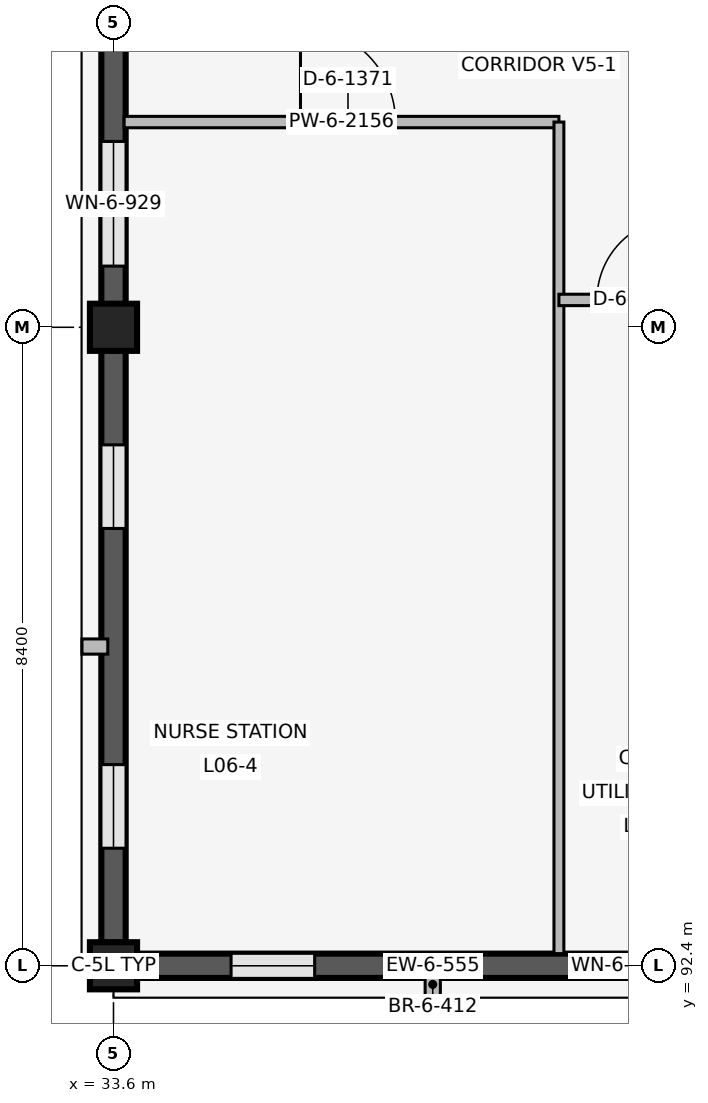
"""IFC4 building model, lengths in metres.
Left out: names, types, materials, properties, quantities, classifications, styles, units other than length and angle.
Written with IfcOpenShell. Run it as: python <this file> out.ifc"""

import sys

from ifc_helpers import new_model, si_unit, direction, frame, frame_2d, origin, origin_2d, place, context, subcontext, project, spatial, rectangle, extrude, element, fill, save


model = new_model("IFC4")
c1 = context("Model", 3, precision=1e-05, world=origin(), true_north=direction((0.0, 1.0)))
c2 = subcontext(c1, "Body", "Model", "MODEL_VIEW")
j1 = project(units=[si_unit("LENGTHUNIT", "METRE"), si_unit("PLANEANGLEUNIT", "RADIAN")], contexts=[c1])
p1 = place(None, origin())
s1 = spatial("IfcSite", under=j1, at=p1, CompositionType="ELEMENT")
p2 = place(p1, origin())
s2 = spatial("IfcBuilding", under=s1, at=p2, CompositionType="ELEMENT")
p3 = place(p2, frame((0.0, 0.0, 24.6)))
s3 = spatial("IfcBuildingStorey", under=s2, at=p3, CompositionType="ELEMENT", Elevation=24.6)
for number, where, z_axis, x_axis in (
    (1, (33.6, 92.4, 0.0), (0.0, 0.0, 1.0), (1.0, 0.0, 0.0)),
    (2, (33.6, 100.8, 0.0), (0.0, 0.0, 1.0), (1.0, 0.0, 0.0)),
):
    element("IfcColumn", number, at=place(p3, frame(where, z_axis=z_axis, x_axis=x_axis)), inside=s3, PredefinedType="COLUMN", context=c2, shape_type="SweptSolid", body=[
        extrude(rectangle(XDim=0.62, YDim=0.62, at=origin_2d()), origin(), (0.0, 0.0, 1.0), 4.2),
    ])
p4 = place(p3, frame((41.695, 92.4, 0.0), z_axis=(0.0, 0.0, 1.0), x_axis=(-1.0, 0.0, 0.0)))
e3 = element("IfcWall", 3, at=p4, inside=s3, PredefinedType="SOLIDWALL", context=c2, shape_type="SweptSolid", body=[
    extrude(rectangle(XDim=7.79, YDim=0.32, at=frame_2d((3.895, 0.0))), origin(), (0.0, 0.0, 1.0), 3.34),
])
p5 = place(p4, frame((0.89, 0.0, 0.85)))
e4 = element("IfcOpeningElement", 4, at=p5, cuts=e3, PredefinedType="OPENING", context=c2, shape_type="SweptSolid", body=[
    extrude(rectangle(XDim=1.1, YDim=1.6, at=frame_2d((0.55, 0.8))), frame((0.0, 0.17, 0.0), z_axis=(0.0, -1.0, 0.0), x_axis=(1.0, 0.0, 0.0)), (0.0, 0.0, 1.0), 0.34),
])
p6 = place(p4, frame((5.448, 0.0, 0.85)))
e5 = element("IfcOpeningElement", 5, at=p6, cuts=e3, PredefinedType="OPENING", context=c2, shape_type="SweptSolid", body=[
    extrude(rectangle(XDim=1.1, YDim=1.6, at=frame_2d((0.55, 0.8))), frame((0.0, 0.17, 0.0), z_axis=(0.0, -1.0, 0.0), x_axis=(1.0, 0.0, 0.0)), (0.0, 0.0, 1.0), 0.34),
])
p7 = place(p3, frame((37.8, 92.325, 0.0), z_axis=(0.0, 0.0, 1.0), x_axis=(0.0, -1.0, 0.0)))
e6 = element("IfcWall", 6, at=p7, inside=s3, PredefinedType="ELEMENTEDWALL", context=c2, shape_type="SweptSolid", body=[
    extrude(rectangle(XDim=0.34, YDim=0.2, at=frame_2d((0.17, 0.0))), origin(), (0.0, 0.0, 1.0), 3.32),
])
p8 = place(p3, frame((33.6, 92.705, 0.0), z_axis=(0.0, 0.0, 1.0), x_axis=(0.0, 1.0, 0.0)))
e7 = element("IfcWall", 7, at=p8, inside=s3, PredefinedType="SOLIDWALL", context=c2, shape_type="SweptSolid", body=[
    extrude(rectangle(XDim=7.79, YDim=0.32, at=frame_2d((3.895, 0.0))), origin(), (0.0, 0.0, 1.0), 3.34),
])
p9 = place(p8, frame((1.242, 0.0, 0.85)))
e8 = element("IfcOpeningElement", 8, at=p9, cuts=e7, PredefinedType="OPENING", context=c2, shape_type="SweptSolid", body=[
    extrude(rectangle(XDim=1.1, YDim=1.6, at=frame_2d((0.55, 0.8))), frame((0.0, 0.17, 0.0), z_axis=(0.0, -1.0, 0.0), x_axis=(1.0, 0.0, 0.0)), (0.0, 0.0, 1.0), 0.34),
])
p10 = place(p8, frame((5.448, 0.0, 0.85)))
e9 = element("IfcOpeningElement", 9, at=p10, cuts=e7, PredefinedType="OPENING", context=c2, shape_type="SweptSolid", body=[
    extrude(rectangle(XDim=1.1, YDim=1.6, at=frame_2d((0.55, 0.8))), frame((0.0, 0.17, 0.0), z_axis=(0.0, -1.0, 0.0), x_axis=(1.0, 0.0, 0.0)), (0.0, 0.0, 1.0), 0.34),
])
p11 = place(p3, frame((33.525, 96.6, 0.0), z_axis=(0.0, 0.0, 1.0), x_axis=(-1.0, 0.0, 0.0)))
e10 = element("IfcWall", 10, at=p11, inside=s3, PredefinedType="ELEMENTEDWALL", context=c2, shape_type="SweptSolid", body=[
    extrude(rectangle(XDim=0.34, YDim=0.2, at=frame_2d((0.17, 0.0))), origin(), (0.0, 0.0, 1.0), 3.32),
])
p12 = place(p3, frame((33.6, 101.105, 0.0), z_axis=(0.0, 0.0, 1.0), x_axis=(0.0, 1.0, 0.0)))
e11 = element("IfcWall", 11, at=p12, inside=s3, PredefinedType="SOLIDWALL", context=c2, shape_type="SweptSolid", body=[
    extrude(rectangle(XDim=7.79, YDim=0.32, at=frame_2d((3.895, 0.0))), origin(), (0.0, 0.0, 1.0), 3.34),
])
p13 = place(p12, frame((0.5, 0.0, 0.85)))
e12 = element("IfcOpeningElement", 12, at=p13, cuts=e11, PredefinedType="OPENING", context=c2, shape_type="SweptSolid", body=[
    extrude(rectangle(XDim=1.64, YDim=1.75, at=frame_2d((0.82, 0.875))), frame((0.0, 0.17, 0.0), z_axis=(0.0, -1.0, 0.0), x_axis=(1.0, 0.0, 0.0)), (0.0, 0.0, 1.0), 0.34),
])
p14 = place(p12, frame((5.7, 0.0, 0.85)))
e13 = element("IfcOpeningElement", 13, at=p14, cuts=e11, PredefinedType="OPENING", context=c2, shape_type="SweptSolid", body=[
    extrude(rectangle(XDim=1.64, YDim=1.75, at=frame_2d((0.82, 0.875))), frame((0.0, 0.17, 0.0), z_axis=(0.0, -1.0, 0.0), x_axis=(1.0, 0.0, 0.0)), (0.0, 0.0, 1.0), 0.34),
])
p15 = place(p3, frame((33.74, 103.5, 0.0), z_axis=(0.0, 0.0, 1.0), x_axis=(1.0, 0.0, 0.0)))
e14 = element("IfcWall", 14, at=p15, inside=s3, PredefinedType="PARTITIONING", context=c2, shape_type="SweptSolid", body=[
    extrude(rectangle(XDim=5.72, YDim=0.15, at=frame_2d((2.86, 0.0))), origin(), (0.0, 0.0, 1.0), 3.32),
])
p16 = place(p15, frame((2.32, 0.0, 0.0)))
e15 = element("IfcOpeningElement", 15, at=p16, cuts=e14, PredefinedType="OPENING", context=c2, shape_type="SweptSolid", body=[
    extrude(rectangle(XDim=1.25, YDim=2.2, at=frame_2d((0.625, 1.1))), frame((0.0, 0.085, 0.0), z_axis=(0.0, -1.0, 0.0), x_axis=(1.0, 0.0, 0.0)), (0.0, 0.0, 1.0), 0.17),
])
p17 = place(p3, frame((39.46, 92.56, 0.0), z_axis=(0.0, 0.0, 1.0), x_axis=(0.0, 1.0, 0.0)))
e16 = element("IfcWall", 16, at=p17, inside=s3, PredefinedType="PARTITIONING", context=c2, shape_type="SweptSolid", body=[
    extrude(rectangle(XDim=10.94, YDim=0.13, at=frame_2d((5.47, 0.0))), origin(), (0.0, 0.0, 1.0), 3.32),
])
p18 = place(p3, frame((39.46, 101.16, 0.0), z_axis=(0.0, 0.0, 1.0), x_axis=(1.0, 0.0, 0.0)))
e17 = element("IfcWall", 17, at=p18, inside=s3, PredefinedType="PARTITIONING", context=c2, shape_type="SweptSolid", body=[
    extrude(rectangle(XDim=2.18, YDim=0.15, at=frame_2d((1.09, 0.0))), origin(), (0.0, 0.0, 1.0), 3.32),
])
p19 = place(p18, frame((0.5, 0.0, 0.0)))
e18 = element("IfcOpeningElement", 18, at=p19, cuts=e17, PredefinedType="OPENING", context=c2, shape_type="SweptSolid", body=[
    extrude(rectangle(XDim=1.08, YDim=2.15, at=frame_2d((0.54, 1.075))), frame((0.0, 0.085, 0.0), z_axis=(0.0, -1.0, 0.0), x_axis=(1.0, 0.0, 0.0)), (0.0, 0.0, 1.0), 0.17),
])
p20 = place(p5, origin())
e19 = element("IfcWindow", 19, at=p20, inside=s3, PartitioningType="SINGLE_PANEL", PredefinedType="WINDOW", context=c2, shape_type="SweptSolid", body=[
    extrude(rectangle(XDim=1.1, YDim=1.6, at=frame_2d((0.55, 0.8))), frame((0.0, 0.03, 0.0), z_axis=(0.0, -1.0, 0.0), x_axis=(1.0, 0.0, 0.0)), (0.0, 0.0, 1.0), 0.06),
])
fill(e4, e19)
p21 = place(p6, origin())
e20 = element("IfcWindow", 20, at=p21, inside=s3, PartitioningType="SINGLE_PANEL", PredefinedType="WINDOW", context=c2, shape_type="SweptSolid", body=[
    extrude(rectangle(XDim=1.1, YDim=1.6, at=frame_2d((0.55, 0.8))), frame((0.0, 0.03, 0.0), z_axis=(0.0, -1.0, 0.0), x_axis=(1.0, 0.0, 0.0)), (0.0, 0.0, 1.0), 0.06),
])
fill(e5, e20)
p22 = place(p9, origin())
e21 = element("IfcWindow", 21, at=p22, inside=s3, PartitioningType="SINGLE_PANEL", PredefinedType="WINDOW", context=c2, shape_type="SweptSolid", body=[
    extrude(rectangle(XDim=1.1, YDim=1.6, at=frame_2d((0.55, 0.8))), frame((0.0, 0.03, 0.0), z_axis=(0.0, -1.0, 0.0), x_axis=(1.0, 0.0, 0.0)), (0.0, 0.0, 1.0), 0.06),
])
fill(e8, e21)
p23 = place(p10, origin())
e22 = element("IfcWindow", 22, at=p23, inside=s3, PartitioningType="SINGLE_PANEL", PredefinedType="WINDOW", context=c2, shape_type="SweptSolid", body=[
    extrude(rectangle(XDim=1.1, YDim=1.6, at=frame_2d((0.55, 0.8))), frame((0.0, 0.03, 0.0), z_axis=(0.0, -1.0, 0.0), x_axis=(1.0, 0.0, 0.0)), (0.0, 0.0, 1.0), 0.06),
])
fill(e9, e22)
p24 = place(p13, origin())
e23 = element("IfcWindow", 23, at=p24, inside=s3, PartitioningType="SINGLE_PANEL", PredefinedType="WINDOW", context=c2, shape_type="SweptSolid", body=[
    extrude(rectangle(XDim=1.64, YDim=1.75, at=frame_2d((0.82, 0.875))), frame((0.0, 0.03, 0.0), z_axis=(0.0, -1.0, 0.0), x_axis=(1.0, 0.0, 0.0)), (0.0, 0.0, 1.0), 0.06),
])
fill(e12, e23)
p25 = place(p16, origin())
e24 = element("IfcDoor", 24, at=p25, inside=s3, OperationType="SINGLE_SWING_LEFT", PredefinedType="DOOR", context=c2, shape_type="SweptSolid", body=[
    extrude(rectangle(XDim=1.25, YDim=2.2, at=frame_2d((0.625, 1.1))), frame((0.0, 0.025, 0.0), z_axis=(0.0, -1.0, 0.0), x_axis=(1.0, 0.0, 0.0)), (0.0, 0.0, 1.0), 0.05),
])
fill(e15, e24)
p26 = place(p19, origin())
e25 = element("IfcDoor", 25, at=p26, inside=s3, OperationType="SINGLE_SWING_RIGHT", PredefinedType="DOOR", context=c2, shape_type="SweptSolid", body=[
    extrude(rectangle(XDim=1.08, YDim=2.15, at=frame_2d((0.54, 1.075))), frame((0.0, 0.025, 0.0), z_axis=(0.0, -1.0, 0.0), x_axis=(1.0, 0.0, 0.0)), (0.0, 0.0, 1.0), 0.05),
])
fill(e18, e25)
save(model, sys.argv[1])
